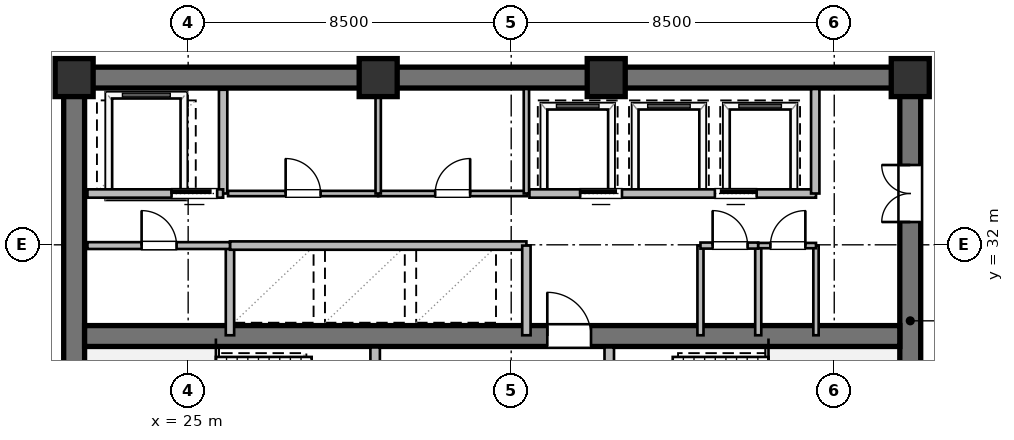
"""IFC4 building model, lengths in metres.
Left out: names, types, materials, properties, quantities, classifications, styles, units other than length and angle.
Written with IfcOpenShell. Run it as: python <this file> out.ifc"""

import sys

from ifc_helpers import new_model, si_unit, direction, frame, frame_2d, origin, origin_2d, place, context, subcontext, project, spatial, rectangle, extrude, element, fill, save


model = new_model("IFC4")
c1 = context("Model", 3, precision=1e-05, world=origin(), true_north=direction((0.0, 1.0)))
c2 = subcontext(c1, "Body", "Model", "MODEL_VIEW")
j1 = project(units=[si_unit("LENGTHUNIT", "METRE"), si_unit("PLANEANGLEUNIT", "RADIAN")], contexts=[c1])
p1 = place(None, origin())
s1 = spatial("IfcSite", under=j1, at=p1, CompositionType="ELEMENT")
p2 = place(p1, origin())
s2 = spatial("IfcBuilding", under=s1, at=p2, CompositionType="ELEMENT")
p3 = place(p2, frame((0.0, 0.0, 160.2)))
s3 = spatial("IfcBuildingStorey", under=s2, at=p3, CompositionType="ELEMENT", Elevation=160.2)
p4 = place(p3, frame((21.725, 36.4, 0.0), z_axis=(0.0, 0.0, 1.0), x_axis=(1.0, 0.0, 0.0)))
e1 = element("IfcWall", 1, at=p4, inside=s3, PredefinedType="SHEAR", context=c2, shape_type="SweptSolid", body=[
    extrude(rectangle(XDim=22.55, YDim=0.55, at=frame_2d((11.275, 0.0))), origin(), (0.0, 0.0, 1.0), 3.36),
])
p5 = place(p3, frame((22.0, 23.875, 0.0), z_axis=(0.0, 0.0, 1.0), x_axis=(0.0, 1.0, 0.0)))
e2 = element("IfcWall", 2, at=p5, inside=s3, PredefinedType="SHEAR", context=c2, shape_type="SweptSolid", body=[
    extrude(rectangle(XDim=12.25, YDim=0.55, at=frame_2d((6.125, 0.0))), origin(), (0.0, 0.0, 1.0), 3.36),
])
p6 = place(p3, frame((44.0, 23.875, 0.0), z_axis=(0.0, 0.0, 1.0), x_axis=(0.0, 1.0, 0.0)))
e3 = element("IfcWall", 3, at=p6, inside=s3, PredefinedType="SHEAR", context=c2, shape_type="SweptSolid", body=[
    extrude(rectangle(XDim=12.25, YDim=0.55, at=frame_2d((6.125, 0.0))), origin(), (0.0, 0.0, 1.0), 3.36),
])
p7 = place(p6, frame((8.725, 0.0, 0.0)))
e4 = element("IfcOpeningElement", 4, at=p7, cuts=e3, PredefinedType="OPENING", context=c2, shape_type="SweptSolid", body=[
    extrude(rectangle(XDim=1.5, YDim=2.15, at=frame_2d((0.75, 1.075))), frame((0.0, 0.285, 0.0), z_axis=(0.0, -1.0, 0.0), x_axis=(1.0, 0.0, 0.0)), (0.0, 0.0, 1.0), 0.57),
])
p8 = place(p3, frame((22.275, 29.6, 0.0), z_axis=(0.0, 0.0, 1.0), x_axis=(1.0, 0.0, 0.0)))
e5 = element("IfcWall", 5, at=p8, inside=s3, PredefinedType="SHEAR", context=c2, shape_type="SweptSolid", body=[
    extrude(rectangle(XDim=21.45, YDim=0.55, at=frame_2d((10.725, 0.0))), origin(), (0.0, 0.0, 1.0), 3.36),
])
p9 = place(p8, frame((12.175, 0.0, 0.0)))
e6 = element("IfcOpeningElement", 6, at=p9, cuts=e5, PredefinedType="OPENING", context=c2, shape_type="SweptSolid", body=[
    extrude(rectangle(XDim=1.15, YDim=2.1, at=frame_2d((0.575, 1.05))), frame((0.0, 0.285, 0.0), z_axis=(0.0, -1.0, 0.0), x_axis=(1.0, 0.0, 0.0)), (0.0, 0.0, 1.0), 0.57),
])
for number, where, z_axis, x_axis in (
    (7, (44.0, 36.4, 0.0), (0.0, 0.0, 1.0), (1.0, 0.0, 0.0)),
    (8, (36.0, 36.4, 0.0), (0.0, 0.0, 1.0), (1.0, 0.0, 0.0)),
    (9, (30.0, 36.4, 0.0), (0.0, 0.0, 1.0), (1.0, 0.0, 0.0)),
    (10, (22.0, 36.4, 0.0), (0.0, 0.0, 1.0), (1.0, 0.0, 0.0)),
):
    element("IfcColumn", number, at=place(p3, frame(where, z_axis=z_axis, x_axis=x_axis)), inside=s3, PredefinedType="COLUMN", context=c2, shape_type="SweptSolid", body=[
        extrude(rectangle(XDim=1.0, YDim=1.0, at=origin_2d()), origin(), (0.0, 0.0, 1.0), 3.6),
    ])
p10 = place(p3, frame((29.92, 23.9, 0.0), z_axis=(0.0, 0.0, 1.0), x_axis=(0.0, 1.0, 0.0)))
e11 = element("IfcWall", 11, at=p10, inside=s3, PredefinedType="SOLIDWALL", context=c2, shape_type="SweptSolid", body=[
    extrude(rectangle(XDim=5.4, YDim=0.25, at=frame_2d((2.7, 0.0))), origin(), (0.0, 0.0, 1.0), 2.806),
])
p11 = place(p10, frame((3.421, 0.0, 0.0)))
e12 = element("IfcOpeningElement", 12, at=p11, cuts=e11, PredefinedType="OPENING", context=c2, shape_type="SweptSolid", body=[
    extrude(rectangle(XDim=1.15, YDim=2.1, at=frame_2d((0.575, 1.05))), frame((0.0, 0.135, 0.0), z_axis=(0.0, -1.0, 0.0), x_axis=(1.0, 0.0, 0.0)), (0.0, 0.0, 1.0), 0.27),
])
p12 = place(p3, frame((36.08, 23.9, 0.0), z_axis=(0.0, 0.0, 1.0), x_axis=(0.0, 1.0, 0.0)))
e13 = element("IfcWall", 13, at=p12, inside=s3, PredefinedType="SOLIDWALL", context=c2, shape_type="SweptSolid", body=[
    extrude(rectangle(XDim=5.4, YDim=0.25, at=frame_2d((2.7, 0.0))), origin(), (0.0, 0.0, 1.0), 3.36),
])
p13 = place(p12, frame((3.421, 0.0, 0.0)))
e14 = element("IfcOpeningElement", 14, at=p13, cuts=e13, PredefinedType="OPENING", context=c2, shape_type="SweptSolid", body=[
    extrude(rectangle(XDim=1.15, YDim=2.1, at=frame_2d((0.575, 1.05))), frame((0.0, 0.135, 0.0), z_axis=(0.0, -1.0, 0.0), x_axis=(1.0, 0.0, 0.0)), (0.0, 0.0, 1.0), 0.27),
])
p14 = place(p3, frame((25.92, 33.35, 0.0), z_axis=(0.0, 0.0, 1.0), x_axis=(0.0, 1.0, 0.0)))
e15 = element("IfcWall", 15, at=p14, inside=s3, PredefinedType="SOLIDWALL", context=c2, shape_type="SweptSolid", body=[
    extrude(rectangle(XDim=2.73, YDim=0.22, at=frame_2d((1.365, 0.0))), origin(), (0.0, 0.0, 1.0), 3.36),
])
p15 = place(p3, frame((22.35, 33.35, 0.0), z_axis=(0.0, 0.0, 1.0), x_axis=(1.0, 0.0, 0.0)))
e16 = element("IfcWall", 16, at=p15, inside=s3, PredefinedType="SOLIDWALL", context=c2, shape_type="SweptSolid", body=[
    extrude(rectangle(XDim=3.57, YDim=0.22, at=frame_2d((1.785, 0.0))), origin(), (0.0, 0.0, 1.0), 3.36),
])
p16 = place(p15, frame((2.213, 0.0, 0.0)))
e17 = element("IfcOpeningElement", 17, at=p16, cuts=e16, PredefinedType="OPENING", context=c2, shape_type="SweptSolid", body=[
    extrude(rectangle(XDim=1.2, YDim=2.1, at=frame_2d((0.6, 1.05))), frame((0.0, 0.12, 0.0), z_axis=(0.0, -1.0, 0.0), x_axis=(1.0, 0.0, 0.0)), (0.0, 0.0, 1.0), 0.24),
])
p17 = place(p3, frame((26.1, 29.62, 0.0), z_axis=(0.0, 0.0, 1.0), x_axis=(0.0, 1.0, 0.0)))
e18 = element("IfcWall", 18, at=p17, inside=s3, PredefinedType="SOLIDWALL", context=c2, shape_type="SweptSolid", body=[
    extrude(rectangle(XDim=2.36, YDim=0.22, at=frame_2d((1.18, 0.0))), origin(), (0.0, 0.0, 1.0), 3.36),
])
p18 = place(p3, frame((26.1, 31.98, 0.0), z_axis=(0.0, 0.0, 1.0), x_axis=(1.0, 0.0, 0.0)))
e19 = element("IfcWall", 19, at=p18, inside=s3, PredefinedType="SOLIDWALL", context=c2, shape_type="SweptSolid", body=[
    extrude(rectangle(XDim=7.8, YDim=0.22, at=frame_2d((3.9, 0.0))), origin(), (0.0, 0.0, 1.0), 3.36),
])
p19 = place(p3, frame((33.9, 29.62, 0.0), z_axis=(0.0, 0.0, 1.0), x_axis=(0.0, 1.0, 0.0)))
e20 = element("IfcWall", 20, at=p19, inside=s3, PredefinedType="SOLIDWALL", context=c2, shape_type="SweptSolid", body=[
    extrude(rectangle(XDim=2.36, YDim=0.22, at=frame_2d((1.18, 0.0))), origin(), (0.0, 0.0, 1.0), 3.36),
])
p20 = place(p3, frame((26.05, 33.35, 0.0), z_axis=(0.0, 0.0, 1.0), x_axis=(1.0, 0.0, 0.0)))
e21 = element("IfcWall", 21, at=p20, inside=s3, PredefinedType="PARTITIONING", context=c2, shape_type="SweptSolid", body=[
    extrude(rectangle(XDim=3.95, YDim=0.14, at=frame_2d((1.975, 0.0))), origin(), (0.0, 0.0, 1.0), 3.36),
])
p21 = place(p20, frame((1.515, 0.0, 0.0)))
e22 = element("IfcOpeningElement", 22, at=p21, cuts=e21, PredefinedType="OPENING", context=c2, shape_type="SweptSolid", body=[
    extrude(rectangle(XDim=0.92, YDim=2.1, at=frame_2d((0.46, 1.05))), frame((0.0, 0.08, 0.0), z_axis=(0.0, -1.0, 0.0), x_axis=(1.0, 0.0, 0.0)), (0.0, 0.0, 1.0), 0.16),
])
p22 = place(p3, frame((30.0, 33.35, 0.0), z_axis=(0.0, 0.0, 1.0), x_axis=(1.0, 0.0, 0.0)))
e23 = element("IfcWall", 23, at=p22, inside=s3, PredefinedType="PARTITIONING", context=c2, shape_type="SweptSolid", body=[
    extrude(rectangle(XDim=3.92, YDim=0.14, at=frame_2d((1.96, 0.0))), origin(), (0.0, 0.0, 1.0), 3.36),
])
p23 = place(p22, frame((1.5, 0.0, 0.0)))
e24 = element("IfcOpeningElement", 24, at=p23, cuts=e23, PredefinedType="OPENING", context=c2, shape_type="SweptSolid", body=[
    extrude(rectangle(XDim=0.92, YDim=2.1, at=frame_2d((0.46, 1.05))), frame((0.0, 0.08, 0.0), z_axis=(0.0, -1.0, 0.0), x_axis=(1.0, 0.0, 0.0)), (0.0, 0.0, 1.0), 0.16),
])
for number, where, z_axis, x_axis in (
    (25, (30.0, 33.35, 0.0), (0.0, 0.0, 1.0), (0.0, 1.0, 0.0)),
    (26, (33.9, 33.35, 0.0), (0.0, 0.0, 1.0), (0.0, 1.0, 0.0)),
):
    element("IfcWall", number, at=place(p3, frame(where, z_axis=z_axis, x_axis=x_axis)), inside=s3, PredefinedType="PARTITIONING", context=c2, shape_type="SweptSolid", body=[
        extrude(rectangle(XDim=2.75, YDim=0.14, at=frame_2d((1.375, 0.0))), origin(), (0.0, 0.0, 1.0), 3.36),
    ])
p24 = place(p3, frame((33.98, 33.35, 0.0), z_axis=(0.0, 0.0, 1.0), x_axis=(1.0, 0.0, 0.0)))
e27 = element("IfcWall", 27, at=p24, inside=s3, PredefinedType="SOLIDWALL", context=c2, shape_type="SweptSolid", body=[
    extrude(rectangle(XDim=7.54, YDim=0.22, at=frame_2d((3.77, 0.0))), origin(), (0.0, 0.0, 1.0), 3.36),
])
p25 = place(p24, frame((1.335, 0.0, 0.0)))
e28 = element("IfcOpeningElement", 28, at=p25, cuts=e27, PredefinedType="OPENING", context=c2, shape_type="SweptSolid", body=[
    extrude(rectangle(XDim=1.1, YDim=2.1, at=frame_2d((0.55, 1.05))), frame((0.0, 0.12, 0.0), z_axis=(0.0, -1.0, 0.0), x_axis=(1.0, 0.0, 0.0)), (0.0, 0.0, 1.0), 0.24),
])
p26 = place(p24, frame((4.879, 0.0, 0.0)))
e29 = element("IfcOpeningElement", 29, at=p26, cuts=e27, PredefinedType="OPENING", context=c2, shape_type="SweptSolid", body=[
    extrude(rectangle(XDim=1.1, YDim=2.1, at=frame_2d((0.55, 1.05))), frame((0.0, 0.12, 0.0), z_axis=(0.0, -1.0, 0.0), x_axis=(1.0, 0.0, 0.0)), (0.0, 0.0, 1.0), 0.24),
])
p27 = place(p3, frame((41.5, 33.35, 0.0), z_axis=(0.0, 0.0, 1.0), x_axis=(0.0, 1.0, 0.0)))
e30 = element("IfcWall", 30, at=p27, inside=s3, PredefinedType="SOLIDWALL", context=c2, shape_type="SweptSolid", body=[
    extrude(rectangle(XDim=2.75, YDim=0.22, at=frame_2d((1.375, 0.0))), origin(), (0.0, 0.0, 1.0), 3.36),
])
p28 = place(p3, frame((22.35, 31.98, 0.0), z_axis=(0.0, 0.0, 1.0), x_axis=(1.0, 0.0, 0.0)))
e31 = element("IfcWall", 31, at=p28, inside=s3, PredefinedType="PARTITIONING", context=c2, shape_type="SweptSolid", body=[
    extrude(rectangle(XDim=3.75, YDim=0.18, at=frame_2d((1.875, 0.0))), origin(), (0.0, 0.0, 1.0), 3.36),
])
p29 = place(p28, frame((1.425, 0.0, 0.0)))
e32 = element("IfcOpeningElement", 32, at=p29, cuts=e31, PredefinedType="OPENING", context=c2, shape_type="SweptSolid", body=[
    extrude(rectangle(XDim=0.92, YDim=2.1, at=frame_2d((0.46, 1.05))), frame((0.0, 0.1, 0.0), z_axis=(0.0, -1.0, 0.0), x_axis=(1.0, 0.0, 0.0)), (0.0, 0.0, 1.0), 0.2),
])
for number, where, z_axis, x_axis in (
    (33, (38.48, 29.62, 0.0), (0.0, 0.0, 1.0), (0.0, 1.0, 0.0)),
    (34, (40.0, 29.62, 0.0), (0.0, 0.0, 1.0), (0.0, 1.0, 0.0)),
):
    element("IfcWall", number, at=place(p3, frame(where, z_axis=z_axis, x_axis=x_axis)), inside=s3, PredefinedType="PLUMBINGWALL", context=c2, shape_type="SweptSolid", body=[
        extrude(rectangle(XDim=2.36, YDim=0.16, at=frame_2d((1.18, 0.0))), origin(), (0.0, 0.0, 1.0), 3.36),
    ])
p30 = place(p3, frame((41.52, 29.62, 0.0), z_axis=(0.0, 0.0, 1.0), x_axis=(0.0, 1.0, 0.0)))
e35 = element("IfcWall", 35, at=p30, inside=s3, PredefinedType="PARTITIONING", context=c2, shape_type="SweptSolid", body=[
    extrude(rectangle(XDim=2.36, YDim=0.14, at=frame_2d((1.18, 0.0))), origin(), (0.0, 0.0, 1.0), 3.36),
])
p31 = place(p3, frame((38.48, 31.98, 0.0), z_axis=(0.0, 0.0, 1.0), x_axis=(1.0, 0.0, 0.0)))
e36 = element("IfcWall", 36, at=p31, inside=s3, PredefinedType="PLUMBINGWALL", context=c2, shape_type="SweptSolid", body=[
    extrude(rectangle(XDim=1.52, YDim=0.16, at=frame_2d((0.76, 0.0))), origin(), (0.0, 0.0, 1.0), 3.36),
])
p32 = place(p31, frame((0.32, 0.0, 0.0)))
e37 = element("IfcOpeningElement", 37, at=p32, cuts=e36, PredefinedType="OPENING", context=c2, shape_type="SweptSolid", body=[
    extrude(rectangle(XDim=0.92, YDim=2.1, at=frame_2d((0.46, 1.05))), frame((0.0, 0.09, 0.0), z_axis=(0.0, -1.0, 0.0), x_axis=(1.0, 0.0, 0.0)), (0.0, 0.0, 1.0), 0.18),
])
p33 = place(p3, frame((40.0, 31.98, 0.0), z_axis=(0.0, 0.0, 1.0), x_axis=(1.0, 0.0, 0.0)))
e38 = element("IfcWall", 38, at=p33, inside=s3, PredefinedType="PARTITIONING", context=c2, shape_type="SweptSolid", body=[
    extrude(rectangle(XDim=1.52, YDim=0.14, at=frame_2d((0.76, 0.0))), origin(), (0.0, 0.0, 1.0), 3.36),
])
p34 = place(p33, frame((0.32, 0.0, 0.0)))
e39 = element("IfcOpeningElement", 39, at=p34, cuts=e38, PredefinedType="OPENING", context=c2, shape_type="SweptSolid", body=[
    extrude(rectangle(XDim=0.92, YDim=2.1, at=frame_2d((0.46, 1.05))), frame((0.0, 0.08, 0.0), z_axis=(0.0, -1.0, 0.0), x_axis=(1.0, 0.0, 0.0)), (0.0, 0.0, 1.0), 0.16),
])
p35 = place(p9, origin())
e40 = element("IfcDoor", 40, at=p35, inside=s3, OperationType="SINGLE_SWING_LEFT", PredefinedType="DOOR", context=c2, shape_type="SweptSolid", body=[
    extrude(rectangle(XDim=1.15, YDim=2.1, at=frame_2d((0.575, 1.05))), frame((0.0, 0.025, 0.0), z_axis=(0.0, -1.0, 0.0), x_axis=(1.0, 0.0, 0.0)), (0.0, 0.0, 1.0), 0.05),
])
fill(e6, e40)
p36 = place(p7, origin())
e41 = element("IfcDoor", 41, at=p36, inside=s3, OperationType="DOUBLE_DOOR_SINGLE_SWING", PredefinedType="DOOR", context=c2, shape_type="SweptSolid", body=[
    extrude(rectangle(XDim=1.5, YDim=2.15, at=frame_2d((0.75, 1.075))), frame((0.0, 0.025, 0.0), z_axis=(0.0, -1.0, 0.0), x_axis=(1.0, 0.0, 0.0)), (0.0, 0.0, 1.0), 0.05),
])
fill(e4, e41)
p37 = place(p16, origin())
e42 = element("IfcDoor", 42, at=p37, inside=s3, OperationType="SLIDING_TO_LEFT", PredefinedType="DOOR", context=c2, shape_type="SweptSolid", body=[
    extrude(rectangle(XDim=1.2, YDim=2.1, at=frame_2d((0.6, 1.05))), frame((0.0, 0.025, 0.0), z_axis=(0.0, -1.0, 0.0), x_axis=(1.0, 0.0, 0.0)), (0.0, 0.0, 1.0), 0.05),
])
fill(e17, e42)
p38 = place(p21, origin())
e43 = element("IfcDoor", 43, at=p38, inside=s3, OperationType="SINGLE_SWING_LEFT", PredefinedType="DOOR", context=c2, shape_type="SweptSolid", body=[
    extrude(rectangle(XDim=0.92, YDim=2.1, at=frame_2d((0.46, 1.05))), frame((0.0, 0.025, 0.0), z_axis=(0.0, -1.0, 0.0), x_axis=(1.0, 0.0, 0.0)), (0.0, 0.0, 1.0), 0.05),
])
fill(e22, e43)
p39 = place(p23, origin())
e44 = element("IfcDoor", 44, at=p39, inside=s3, OperationType="SINGLE_SWING_RIGHT", PredefinedType="DOOR", context=c2, shape_type="SweptSolid", body=[
    extrude(rectangle(XDim=0.92, YDim=2.1, at=frame_2d((0.46, 1.05))), frame((0.0, 0.025, 0.0), z_axis=(0.0, -1.0, 0.0), x_axis=(1.0, 0.0, 0.0)), (0.0, 0.0, 1.0), 0.05),
])
fill(e24, e44)
p40 = place(p25, origin())
e45 = element("IfcDoor", 45, at=p40, inside=s3, OperationType="SLIDING_TO_LEFT", PredefinedType="DOOR", context=c2, shape_type="SweptSolid", body=[
    extrude(rectangle(XDim=1.1, YDim=2.1, at=frame_2d((0.55, 1.05))), frame((0.0, 0.025, 0.0), z_axis=(0.0, -1.0, 0.0), x_axis=(1.0, 0.0, 0.0)), (0.0, 0.0, 1.0), 0.05),
])
fill(e28, e45)
p41 = place(p26, origin())
e46 = element("IfcDoor", 46, at=p41, inside=s3, OperationType="SLIDING_TO_RIGHT", PredefinedType="DOOR", context=c2, shape_type="SweptSolid", body=[
    extrude(rectangle(XDim=1.1, YDim=2.1, at=frame_2d((0.55, 1.05))), frame((0.0, 0.025, 0.0), z_axis=(0.0, -1.0, 0.0), x_axis=(1.0, 0.0, 0.0)), (0.0, 0.0, 1.0), 0.05),
])
fill(e29, e46)
p42 = place(p29, origin())
e47 = element("IfcDoor", 47, at=p42, inside=s3, OperationType="SINGLE_SWING_LEFT", PredefinedType="DOOR", context=c2, shape_type="SweptSolid", body=[
    extrude(rectangle(XDim=0.92, YDim=2.1, at=frame_2d((0.46, 1.05))), frame((0.0, 0.025, 0.0), z_axis=(0.0, -1.0, 0.0), x_axis=(1.0, 0.0, 0.0)), (0.0, 0.0, 1.0), 0.05),
])
fill(e32, e47)
p43 = place(p32, origin())
e48 = element("IfcDoor", 48, at=p43, inside=s3, OperationType="SINGLE_SWING_LEFT", PredefinedType="DOOR", context=c2, shape_type="SweptSolid", body=[
    extrude(rectangle(XDim=0.92, YDim=2.1, at=frame_2d((0.46, 1.05))), frame((0.0, 0.025, 0.0), z_axis=(0.0, -1.0, 0.0), x_axis=(1.0, 0.0, 0.0)), (0.0, 0.0, 1.0), 0.05),
])
fill(e37, e48)
p44 = place(p34, origin())
e49 = element("IfcDoor", 49, at=p44, inside=s3, OperationType="SINGLE_SWING_RIGHT", PredefinedType="DOOR", context=c2, shape_type="SweptSolid", body=[
    extrude(rectangle(XDim=0.92, YDim=2.1, at=frame_2d((0.46, 1.05))), frame((0.0, 0.025, 0.0), z_axis=(0.0, -1.0, 0.0), x_axis=(1.0, 0.0, 0.0)), (0.0, 0.0, 1.0), 0.05),
])
fill(e39, e49)
save(model, sys.argv[1])
